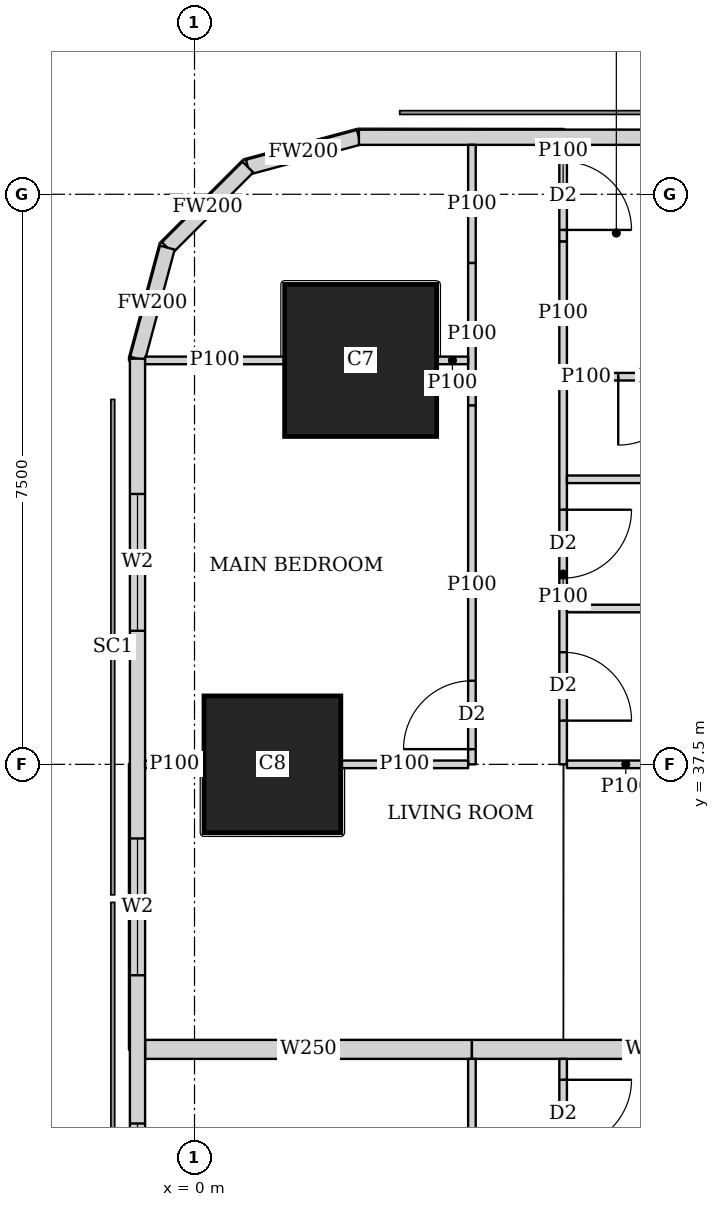
"""IFC4 building model, lengths in metres.
Left out: names, types, materials, properties, quantities, classifications, styles, units other than length and angle.
Written with IfcOpenShell. Run it as: python <this file> out.ifc"""

import sys

from ifc_helpers import new_model, si_unit, direction, frame, frame_2d, origin, origin_2d, place, context, subcontext, project, spatial, rectangle, extrude, element, fill, save


model = new_model("IFC4")
c1 = context("Model", 3, precision=1e-05, world=origin(), true_north=direction((0.0, 1.0)))
c2 = subcontext(c1, "Body", "Model", "MODEL_VIEW")
j1 = project(units=[si_unit("LENGTHUNIT", "METRE"), si_unit("PLANEANGLEUNIT", "RADIAN")], contexts=[c1])
p1 = place(None, origin())
s1 = spatial("IfcSite", under=j1, at=p1, CompositionType="ELEMENT")
p2 = place(p1, origin())
s2 = spatial("IfcBuilding", under=s1, at=p2, CompositionType="ELEMENT")
p3 = place(p2, frame((0.0, 0.0, 135.8)))
s3 = spatial("IfcBuildingStorey", under=s2, at=p3, CompositionType="ELEMENT", Elevation=135.8)
p4 = place(p3, frame((1.025, 37.5, 0.0), z_axis=(0.0, 0.0, 1.0), x_axis=(1.0, 0.0, 0.0)))
e1 = element("IfcColumn", 1, at=p4, inside=s3, PredefinedType="COLUMN", context=c2, shape_type="SweptSolid", body=[
    extrude(rectangle(XDim=1.8, YDim=1.8, at=origin_2d()), origin(), (0.0, 0.0, 1.0), 3.75),
])
p5 = place(p3, frame((2.186, 42.814, 0.0), z_axis=(0.0, 0.0, 1.0), x_axis=(1.0, 0.0, 0.0)))
e2 = element("IfcColumn", 2, at=p5, inside=s3, PredefinedType="COLUMN", context=c2, shape_type="SweptSolid", body=[
    extrude(rectangle(XDim=2.0, YDim=2.0, at=origin_2d()), origin(), (0.0, 0.0, 1.0), 3.75),
])
p6 = place(p3, frame((40.106, 45.75, 0.0), z_axis=(0.0, 0.0, 1.0), x_axis=(-1.0, 0.0, 0.0)))
e3 = element("IfcWall", 3, at=p6, inside=s3, PredefinedType="SOLIDWALL", context=c2, shape_type="SweptSolid", body=[
    extrude(rectangle(XDim=37.943, YDim=0.2, at=frame_2d((18.971, 0.0))), origin(), (0.0, 0.0, 1.0), 3.5),
])
p7 = place(p6, frame((8.606, 0.0, 0.9)))
e4 = element("IfcOpeningElement", 4, at=p7, cuts=e3, PredefinedType="OPENING", context=c2, shape_type="SweptSolid", body=[
    extrude(rectangle(XDim=1.8, YDim=1.5, at=frame_2d((0.9, 0.75))), frame((0.0, 0.11, 0.0), z_axis=(0.0, -1.0, 0.0), x_axis=(1.0, 0.0, 0.0)), (0.0, 0.0, 1.0), 0.22),
])
p8 = place(p6, frame((12.206, 0.0, 0.9)))
e5 = element("IfcOpeningElement", 5, at=p8, cuts=e3, PredefinedType="OPENING", context=c2, shape_type="SweptSolid", body=[
    extrude(rectangle(XDim=1.8, YDim=1.5, at=frame_2d((0.9, 0.75))), frame((0.0, 0.11, 0.0), z_axis=(0.0, -1.0, 0.0), x_axis=(1.0, 0.0, 0.0)), (0.0, 0.0, 1.0), 0.22),
])
p9 = place(p6, frame((15.806, 0.0, 0.9)))
e6 = element("IfcOpeningElement", 6, at=p9, cuts=e3, PredefinedType="OPENING", context=c2, shape_type="SweptSolid", body=[
    extrude(rectangle(XDim=1.8, YDim=1.5, at=frame_2d((0.9, 0.75))), frame((0.0, 0.11, 0.0), z_axis=(0.0, -1.0, 0.0), x_axis=(1.0, 0.0, 0.0)), (0.0, 0.0, 1.0), 0.22),
])
p10 = place(p6, frame((19.406, 0.0, 0.9)))
e7 = element("IfcOpeningElement", 7, at=p10, cuts=e3, PredefinedType="OPENING", context=c2, shape_type="SweptSolid", body=[
    extrude(rectangle(XDim=1.8, YDim=1.5, at=frame_2d((0.9, 0.75))), frame((0.0, 0.11, 0.0), z_axis=(0.0, -1.0, 0.0), x_axis=(1.0, 0.0, 0.0)), (0.0, 0.0, 1.0), 0.22),
])
p11 = place(p6, frame((23.006, 0.0, 0.9)))
e8 = element("IfcOpeningElement", 8, at=p11, cuts=e3, PredefinedType="OPENING", context=c2, shape_type="SweptSolid", body=[
    extrude(rectangle(XDim=1.8, YDim=1.5, at=frame_2d((0.9, 0.75))), frame((0.0, 0.11, 0.0), z_axis=(0.0, -1.0, 0.0), x_axis=(1.0, 0.0, 0.0)), (0.0, 0.0, 1.0), 0.22),
])
p12 = place(p6, frame((26.606, 0.0, 0.9)))
e9 = element("IfcOpeningElement", 9, at=p12, cuts=e3, PredefinedType="OPENING", context=c2, shape_type="SweptSolid", body=[
    extrude(rectangle(XDim=1.8, YDim=1.5, at=frame_2d((0.9, 0.75))), frame((0.0, 0.11, 0.0), z_axis=(0.0, -1.0, 0.0), x_axis=(1.0, 0.0, 0.0)), (0.0, 0.0, 1.0), 0.22),
])
p13 = place(p3, frame((2.163, 45.75, 0.0), z_axis=(0.0, 0.0, 1.0), x_axis=(-0.965832000415, -0.259168954497, 0.0)))
e10 = element("IfcWall", 10, at=p13, inside=s3, PredefinedType="SOLIDWALL", context=c2, shape_type="SweptSolid", body=[
    extrude(rectangle(XDim=1.513, YDim=0.2, at=frame_2d((0.756, 0.0))), origin(), (0.0, 0.0, 1.0), 3.5),
])
p14 = place(p3, frame((0.702, 45.358, 0.0), z_axis=(0.0, 0.0, 1.0), x_axis=(-0.707106781187, -0.707106781187, 0.0)))
e11 = element("IfcWall", 11, at=p14, inside=s3, PredefinedType="SOLIDWALL", context=c2, shape_type="SweptSolid", body=[
    extrude(rectangle(XDim=1.499, YDim=0.2, at=frame_2d((0.75, 0.0))), origin(), (0.0, 0.0, 1.0), 3.5),
])
p15 = place(p3, frame((-0.358, 44.298, 0.0), z_axis=(0.0, 0.0, 1.0), x_axis=(-0.259168954497, -0.965832000415, 0.0)))
e12 = element("IfcWall", 12, at=p15, inside=s3, PredefinedType="SOLIDWALL", context=c2, shape_type="SweptSolid", body=[
    extrude(rectangle(XDim=1.513, YDim=0.2, at=frame_2d((0.756, 0.0))), origin(), (0.0, 0.0, 1.0), 3.5),
])
p16 = place(p3, frame((-0.75, 42.837, 0.0), z_axis=(0.0, 0.0, 1.0), x_axis=(0.0, -1.0, 0.0)))
e13 = element("IfcWall", 13, at=p16, inside=s3, PredefinedType="SOLIDWALL", context=c2, shape_type="SweptSolid", body=[
    extrude(rectangle(XDim=40.674, YDim=0.2, at=frame_2d((20.337, 0.0))), origin(), (0.0, 0.0, 1.0), 3.5),
])
p17 = place(p16, frame((1.78, 0.0, 0.9)))
e14 = element("IfcOpeningElement", 14, at=p17, cuts=e13, PredefinedType="OPENING", context=c2, shape_type="SweptSolid", body=[
    extrude(rectangle(XDim=1.8, YDim=1.5, at=frame_2d((0.9, 0.75))), frame((0.0, 0.11, 0.0), z_axis=(0.0, -1.0, 0.0), x_axis=(1.0, 0.0, 0.0)), (0.0, 0.0, 1.0), 0.22),
])
p18 = place(p16, frame((6.312, 0.0, 0.9)))
e15 = element("IfcOpeningElement", 15, at=p18, cuts=e13, PredefinedType="OPENING", context=c2, shape_type="SweptSolid", body=[
    extrude(rectangle(XDim=1.8, YDim=1.5, at=frame_2d((0.9, 0.75))), frame((0.0, 0.11, 0.0), z_axis=(0.0, -1.0, 0.0), x_axis=(1.0, 0.0, 0.0)), (0.0, 0.0, 1.0), 0.22),
])
p19 = place(p16, frame((10.062, 0.0, 0.9)))
e16 = element("IfcOpeningElement", 16, at=p19, cuts=e13, PredefinedType="OPENING", context=c2, shape_type="SweptSolid", body=[
    extrude(rectangle(XDim=1.8, YDim=1.5, at=frame_2d((0.9, 0.75))), frame((0.0, 0.11, 0.0), z_axis=(0.0, -1.0, 0.0), x_axis=(1.0, 0.0, 0.0)), (0.0, 0.0, 1.0), 0.22),
])
p20 = place(p16, frame((13.812, 0.0, 0.9)))
e17 = element("IfcOpeningElement", 17, at=p20, cuts=e13, PredefinedType="OPENING", context=c2, shape_type="SweptSolid", body=[
    extrude(rectangle(XDim=1.8, YDim=1.5, at=frame_2d((0.9, 0.75))), frame((0.0, 0.11, 0.0), z_axis=(0.0, -1.0, 0.0), x_axis=(1.0, 0.0, 0.0)), (0.0, 0.0, 1.0), 0.22),
])
p21 = place(p16, frame((17.562, 0.0, 0.9)))
e18 = element("IfcOpeningElement", 18, at=p21, cuts=e13, PredefinedType="OPENING", context=c2, shape_type="SweptSolid", body=[
    extrude(rectangle(XDim=1.8, YDim=1.5, at=frame_2d((0.9, 0.75))), frame((0.0, 0.11, 0.0), z_axis=(0.0, -1.0, 0.0), x_axis=(1.0, 0.0, 0.0)), (0.0, 0.0, 1.0), 0.22),
])
p22 = place(p16, frame((21.312, 0.0, 0.9)))
e19 = element("IfcOpeningElement", 19, at=p22, cuts=e13, PredefinedType="OPENING", context=c2, shape_type="SweptSolid", body=[
    extrude(rectangle(XDim=1.8, YDim=1.5, at=frame_2d((0.9, 0.75))), frame((0.0, 0.11, 0.0), z_axis=(0.0, -1.0, 0.0), x_axis=(1.0, 0.0, 0.0)), (0.0, 0.0, 1.0), 0.22),
])
p23 = place(p16, frame((25.062, 0.0, 0.9)))
e20 = element("IfcOpeningElement", 20, at=p23, cuts=e13, PredefinedType="OPENING", context=c2, shape_type="SweptSolid", body=[
    extrude(rectangle(XDim=1.8, YDim=1.5, at=frame_2d((0.9, 0.75))), frame((0.0, 0.11, 0.0), z_axis=(0.0, -1.0, 0.0), x_axis=(1.0, 0.0, 0.0)), (0.0, 0.0, 1.0), 0.22),
])
p24 = place(p16, frame((28.812, 0.0, 0.9)))
e21 = element("IfcOpeningElement", 21, at=p24, cuts=e13, PredefinedType="OPENING", context=c2, shape_type="SweptSolid", body=[
    extrude(rectangle(XDim=1.8, YDim=1.5, at=frame_2d((0.9, 0.75))), frame((0.0, 0.11, 0.0), z_axis=(0.0, -1.0, 0.0), x_axis=(1.0, 0.0, 0.0)), (0.0, 0.0, 1.0), 0.22),
])
p25 = place(p16, frame((32.562, 0.0, 0.9)))
e22 = element("IfcOpeningElement", 22, at=p25, cuts=e13, PredefinedType="OPENING", context=c2, shape_type="SweptSolid", body=[
    extrude(rectangle(XDim=1.8, YDim=1.5, at=frame_2d((0.9, 0.75))), frame((0.0, 0.11, 0.0), z_axis=(0.0, -1.0, 0.0), x_axis=(1.0, 0.0, 0.0)), (0.0, 0.0, 1.0), 0.22),
])
p26 = place(p16, frame((37.094, 0.0, 0.9)))
e23 = element("IfcOpeningElement", 23, at=p26, cuts=e13, PredefinedType="OPENING", context=c2, shape_type="SweptSolid", body=[
    extrude(rectangle(XDim=1.8, YDim=1.5, at=frame_2d((0.9, 0.75))), frame((0.0, 0.11, 0.0), z_axis=(0.0, -1.0, 0.0), x_axis=(1.0, 0.0, 0.0)), (0.0, 0.0, 1.0), 0.22),
])
p27 = place(p3, frame((3.65, 30.0, 0.0), z_axis=(0.0, 0.0, 1.0), x_axis=(0.0, 1.0, 0.0)))
e24 = element("IfcWall", 24, at=p27, inside=s3, PredefinedType="PARTITIONING", context=c2, shape_type="SweptSolid", body=[
    extrude(rectangle(XDim=3.625, YDim=0.1, at=frame_2d((1.812, 0.0))), origin(), (0.0, 0.0, 1.0), 3.5),
])
p28 = place(p27, frame((0.2, 0.0, 0.0)))
e25 = element("IfcOpeningElement", 25, at=p28, cuts=e24, PredefinedType="OPENING", context=c2, shape_type="SweptSolid", body=[
    extrude(rectangle(XDim=0.9, YDim=2.1, at=frame_2d((0.45, 1.05))), frame((0.0, 0.06, 0.0), z_axis=(0.0, -1.0, 0.0), x_axis=(1.0, 0.0, 0.0)), (0.0, 0.0, 1.0), 0.12),
])
p29 = place(p3, frame((4.85, 30.0, 0.0), z_axis=(0.0, 0.0, 1.0), x_axis=(0.0, 1.0, 0.0)))
e26 = element("IfcWall", 26, at=p29, inside=s3, PredefinedType="PARTITIONING", context=c2, shape_type="SweptSolid", body=[
    extrude(rectangle(XDim=3.625, YDim=0.1, at=frame_2d((1.812, 0.0))), origin(), (0.0, 0.0, 1.0), 3.5),
])
p30 = place(p29, frame((0.575, 0.0, 0.0)))
e27 = element("IfcOpeningElement", 27, at=p30, cuts=e26, PredefinedType="OPENING", context=c2, shape_type="SweptSolid", body=[
    extrude(rectangle(XDim=0.9, YDim=2.1, at=frame_2d((0.45, 1.05))), frame((0.0, 0.06, 0.0), z_axis=(0.0, -1.0, 0.0), x_axis=(1.0, 0.0, 0.0)), (0.0, 0.0, 1.0), 0.12),
])
p31 = place(p29, frame((2.45, 0.0, 0.0)))
e28 = element("IfcOpeningElement", 28, at=p31, cuts=e26, PredefinedType="OPENING", context=c2, shape_type="SweptSolid", body=[
    extrude(rectangle(XDim=0.9, YDim=2.1, at=frame_2d((0.45, 1.05))), frame((0.0, 0.06, 0.0), z_axis=(0.0, -1.0, 0.0), x_axis=(1.0, 0.0, 0.0)), (0.0, 0.0, 1.0), 0.12),
])
p32 = place(p3, frame((3.65, 37.5, 0.0), z_axis=(0.0, 0.0, 1.0), x_axis=(0.0, 1.0, 0.0)))
e29 = element("IfcWall", 29, at=p32, inside=s3, PredefinedType="PARTITIONING", context=c2, shape_type="SweptSolid", body=[
    extrude(rectangle(XDim=4.724, YDim=0.1, at=frame_2d((2.362, 0.0))), origin(), (0.0, 0.0, 1.0), 3.5),
])
p33 = place(p32, frame((0.2, 0.0, 0.0)))
e30 = element("IfcOpeningElement", 30, at=p33, cuts=e29, PredefinedType="OPENING", context=c2, shape_type="SweptSolid", body=[
    extrude(rectangle(XDim=0.9, YDim=2.1, at=frame_2d((0.45, 1.05))), frame((0.0, 0.06, 0.0), z_axis=(0.0, -1.0, 0.0), x_axis=(1.0, 0.0, 0.0)), (0.0, 0.0, 1.0), 0.12),
])
p34 = place(p3, frame((3.65, 42.224, 0.0), z_axis=(0.0, 0.0, 1.0), x_axis=(0.0, 1.0, 0.0)))
e31 = element("IfcWall", 31, at=p34, inside=s3, PredefinedType="PARTITIONING", context=c2, shape_type="SweptSolid", body=[
    extrude(rectangle(XDim=1.873, YDim=0.1, at=frame_2d((0.937, 0.0))), origin(), (0.0, 0.0, 1.0), 2.1),
])
p35 = place(p3, frame((3.65, 44.097, 0.0), z_axis=(0.0, 0.0, 1.0), x_axis=(0.0, 1.0, 0.0)))
e32 = element("IfcWall", 32, at=p35, inside=s3, PredefinedType="PARTITIONING", context=c2, shape_type="SweptSolid", body=[
    extrude(rectangle(XDim=1.553, YDim=0.1, at=frame_2d((0.776, 0.0))), origin(), (0.0, 0.0, 1.0), 3.5),
])
p36 = place(p3, frame((4.85, 37.5, 0.0), z_axis=(0.0, 0.0, 1.0), x_axis=(0.0, 1.0, 0.0)))
e33 = element("IfcWall", 33, at=p36, inside=s3, PredefinedType="PARTITIONING", context=c2, shape_type="SweptSolid", body=[
    extrude(rectangle(XDim=5.007, YDim=0.1, at=frame_2d((2.503, 0.0))), origin(), (0.0, 0.0, 1.0), 3.5),
])
p37 = place(p36, frame((0.575, 0.0, 0.0)))
e34 = element("IfcOpeningElement", 34, at=p37, cuts=e33, PredefinedType="OPENING", context=c2, shape_type="SweptSolid", body=[
    extrude(rectangle(XDim=0.9, YDim=2.1, at=frame_2d((0.45, 1.05))), frame((0.0, 0.06, 0.0), z_axis=(0.0, -1.0, 0.0), x_axis=(1.0, 0.0, 0.0)), (0.0, 0.0, 1.0), 0.12),
])
p38 = place(p36, frame((2.45, 0.0, 0.0)))
e35 = element("IfcOpeningElement", 35, at=p38, cuts=e33, PredefinedType="OPENING", context=c2, shape_type="SweptSolid", body=[
    extrude(rectangle(XDim=0.9, YDim=2.1, at=frame_2d((0.45, 1.05))), frame((0.0, 0.06, 0.0), z_axis=(0.0, -1.0, 0.0), x_axis=(1.0, 0.0, 0.0)), (0.0, 0.0, 1.0), 0.12),
])
p39 = place(p3, frame((4.85, 42.507, 0.0), z_axis=(0.0, 0.0, 1.0), x_axis=(0.0, 1.0, 0.0)))
e36 = element("IfcWall", 36, at=p39, inside=s3, PredefinedType="PARTITIONING", context=c2, shape_type="SweptSolid", body=[
    extrude(rectangle(XDim=1.874, YDim=0.1, at=frame_2d((0.937, 0.0))), origin(), (0.0, 0.0, 1.0), 2.1),
])
p40 = place(p3, frame((4.85, 44.381, 0.0), z_axis=(0.0, 0.0, 1.0), x_axis=(0.0, 1.0, 0.0)))
e37 = element("IfcWall", 37, at=p40, inside=s3, PredefinedType="PARTITIONING", context=c2, shape_type="SweptSolid", body=[
    extrude(rectangle(XDim=1.269, YDim=0.1, at=frame_2d((0.634, 0.0))), origin(), (0.0, 0.0, 1.0), 3.5),
])
p41 = place(p40, frame((0.15, 0.0, 0.0)))
e38 = element("IfcOpeningElement", 38, at=p41, cuts=e37, PredefinedType="OPENING", context=c2, shape_type="SweptSolid", body=[
    extrude(rectangle(XDim=0.9, YDim=2.1, at=frame_2d((0.45, 1.05))), frame((0.0, 0.06, 0.0), z_axis=(0.0, -1.0, 0.0), x_axis=(1.0, 0.0, 0.0)), (0.0, 0.0, 1.0), 0.12),
])
p42 = place(p3, frame((-0.65, 37.5, 0.0), z_axis=(0.0, 0.0, 1.0), x_axis=(1.0, 0.0, 0.0)))
e39 = element("IfcWall", 39, at=p42, inside=s3, PredefinedType="PARTITIONING", context=c2, shape_type="SweptSolid", body=[
    extrude(rectangle(XDim=0.774, YDim=0.1, at=frame_2d((0.387, 0.0))), origin(), (0.0, 0.0, 1.0), 3.5),
])
p43 = place(p3, frame((1.926, 37.5, 0.0), z_axis=(0.0, 0.0, 1.0), x_axis=(1.0, 0.0, 0.0)))
e40 = element("IfcWall", 40, at=p43, inside=s3, PredefinedType="PARTITIONING", context=c2, shape_type="SweptSolid", body=[
    extrude(rectangle(XDim=1.674, YDim=0.1, at=frame_2d((0.837, 0.0))), origin(), (0.0, 0.0, 1.0), 2.1),
])
p44 = place(p3, frame((-0.65, 42.814, 0.0), z_axis=(0.0, 0.0, 1.0), x_axis=(1.0, 0.0, 0.0)))
e41 = element("IfcWall", 41, at=p44, inside=s3, PredefinedType="PARTITIONING", context=c2, shape_type="SweptSolid", body=[
    extrude(rectangle(XDim=1.835, YDim=0.1, at=frame_2d((0.917, 0.0))), origin(), (0.0, 0.0, 1.0), 3.5),
])
p45 = place(p3, frame((3.187, 42.814, 0.0), z_axis=(0.0, 0.0, 1.0), x_axis=(1.0, 0.0, 0.0)))
e42 = element("IfcWall", 42, at=p45, inside=s3, PredefinedType="PARTITIONING", context=c2, shape_type="SweptSolid", body=[
    extrude(rectangle(XDim=0.413, YDim=0.1, at=frame_2d((0.207, 0.0))), origin(), (0.0, 0.0, 1.0), 2.1),
])
p46 = place(p3, frame((4.9, 37.5, 0.0), z_axis=(0.0, 0.0, 1.0), x_axis=(1.0, 0.0, 0.0)))
e43 = element("IfcWall", 43, at=p46, inside=s3, PredefinedType="PARTITIONING", context=c2, shape_type="SweptSolid", body=[
    extrude(rectangle(XDim=1.549, YDim=0.1, at=frame_2d((0.774, 0.0))), origin(), (0.0, 0.0, 1.0), 3.5),
])
for number, where, z_axis, x_axis in (
    (44, (4.9, 41.25, 0.0), (0.0, 0.0, 1.0), (1.0, 0.0, 0.0)),
    (45, (4.9, 39.55, 0.0), (0.0, 0.0, 1.0), (1.0, 0.0, 0.0)),
):
    element("IfcWall", number, at=place(p3, frame(where, z_axis=z_axis, x_axis=x_axis)), inside=s3, PredefinedType="PARTITIONING", context=c2, shape_type="SweptSolid", body=[
        extrude(rectangle(XDim=3.525, YDim=0.1, at=frame_2d((1.763, 0.0))), origin(), (0.0, 0.0, 1.0), 3.5),
    ])
p47 = place(p3, frame((-0.65, 33.75, 0.0), z_axis=(0.0, 0.0, 1.0), x_axis=(1.0, 0.0, 0.0)))
e46 = element("IfcWall", 46, at=p47, inside=s3, PredefinedType="SOLIDWALL", context=c2, shape_type="SweptSolid", body=[
    extrude(rectangle(XDim=4.3, YDim=0.25, at=frame_2d((2.15, 0.0))), origin(), (0.0, 0.0, 1.0), 2.1),
])
p48 = place(p3, frame((3.65, 33.75, 0.0), z_axis=(0.0, 0.0, 1.0), x_axis=(1.0, 0.0, 0.0)))
e47 = element("IfcWall", 47, at=p48, inside=s3, PredefinedType="SOLIDWALL", context=c2, shape_type="SweptSolid", body=[
    extrude(rectangle(XDim=4.775, YDim=0.25, at=frame_2d((2.388, 0.0))), origin(), (0.0, 0.0, 1.0), 3.5),
])
p49 = place(p3, frame((8.425, 42.6, 0.0), z_axis=(0.0, 0.0, 1.0), x_axis=(-1.0, 0.0, 0.0)))
e48 = element("IfcWall", 48, at=p49, inside=s3, PredefinedType="PARTITIONING", context=c2, shape_type="SweptSolid", body=[
    extrude(rectangle(XDim=3.022, YDim=0.1, at=frame_2d((1.511, 0.0))), origin(), (0.0, 0.0, 1.0), 3.5),
])
p50 = place(p49, frame((1.95, 0.0, 0.0)))
e49 = element("IfcOpeningElement", 49, at=p50, cuts=e48, PredefinedType="OPENING", context=c2, shape_type="SweptSolid", body=[
    extrude(rectangle(XDim=0.9, YDim=2.1, at=frame_2d((0.45, 1.05))), frame((0.0, 0.06, 0.0), z_axis=(0.0, -1.0, 0.0), x_axis=(1.0, 0.0, 0.0)), (0.0, 0.0, 1.0), 0.12),
])
p51 = place(p3, frame((5.403, 42.6, 0.0), z_axis=(0.0, 0.0, 1.0), x_axis=(-1.0, 0.0, 0.0)))
e50 = element("IfcWall", 50, at=p51, inside=s3, PredefinedType="PARTITIONING", context=c2, shape_type="SweptSolid", body=[
    extrude(rectangle(XDim=0.503, YDim=0.1, at=frame_2d((0.251, 0.0))), origin(), (0.0, 0.0, 1.0), 2.1),
])
p52 = place(p17, origin())
e51 = element("IfcWindow", 51, at=p52, inside=s3, PartitioningType="SINGLE_PANEL", PredefinedType="WINDOW", context=c2, shape_type="SweptSolid", body=[
    extrude(rectangle(XDim=1.8, YDim=1.5, at=frame_2d((0.9, 0.75))), frame((0.0, 0.03, 0.0), z_axis=(0.0, -1.0, 0.0), x_axis=(1.0, 0.0, 0.0)), (0.0, 0.0, 1.0), 0.06),
])
fill(e14, e51)
p53 = place(p18, origin())
e52 = element("IfcWindow", 52, at=p53, inside=s3, PartitioningType="SINGLE_PANEL", PredefinedType="WINDOW", context=c2, shape_type="SweptSolid", body=[
    extrude(rectangle(XDim=1.8, YDim=1.5, at=frame_2d((0.9, 0.75))), frame((0.0, 0.03, 0.0), z_axis=(0.0, -1.0, 0.0), x_axis=(1.0, 0.0, 0.0)), (0.0, 0.0, 1.0), 0.06),
])
fill(e15, e52)
p54 = place(p19, origin())
e53 = element("IfcWindow", 53, at=p54, inside=s3, PartitioningType="SINGLE_PANEL", PredefinedType="WINDOW", context=c2, shape_type="SweptSolid", body=[
    extrude(rectangle(XDim=1.8, YDim=1.5, at=frame_2d((0.9, 0.75))), frame((0.0, 0.03, 0.0), z_axis=(0.0, -1.0, 0.0), x_axis=(1.0, 0.0, 0.0)), (0.0, 0.0, 1.0), 0.06),
])
fill(e16, e53)
p55 = place(p31, origin())
e54 = element("IfcDoor", 54, at=p55, inside=s3, OperationType="SINGLE_SWING_LEFT", PredefinedType="DOOR", context=c2, shape_type="SweptSolid", body=[
    extrude(rectangle(XDim=0.9, YDim=2.1, at=frame_2d((0.45, 1.05))), frame((0.0, 0.025, 0.0), z_axis=(0.0, -1.0, 0.0), x_axis=(1.0, 0.0, 0.0)), (0.0, 0.0, 1.0), 0.05),
])
fill(e28, e54)
p56 = place(p33, origin())
e55 = element("IfcDoor", 55, at=p56, inside=s3, OperationType="SINGLE_SWING_LEFT", PredefinedType="DOOR", context=c2, shape_type="SweptSolid", body=[
    extrude(rectangle(XDim=0.9, YDim=2.1, at=frame_2d((0.45, 1.05))), frame((0.0, 0.025, 0.0), z_axis=(0.0, -1.0, 0.0), x_axis=(1.0, 0.0, 0.0)), (0.0, 0.0, 1.0), 0.05),
])
fill(e30, e55)
p57 = place(p37, origin())
e56 = element("IfcDoor", 56, at=p57, inside=s3, OperationType="SINGLE_SWING_RIGHT", PredefinedType="DOOR", context=c2, shape_type="SweptSolid", body=[
    extrude(rectangle(XDim=0.9, YDim=2.1, at=frame_2d((0.45, 1.05))), frame((0.0, 0.025, 0.0), z_axis=(0.0, -1.0, 0.0), x_axis=(1.0, 0.0, 0.0)), (0.0, 0.0, 1.0), 0.05),
])
fill(e34, e56)
p58 = place(p41, origin())
e57 = element("IfcDoor", 57, at=p58, inside=s3, OperationType="SINGLE_SWING_RIGHT", PredefinedType="DOOR", context=c2, shape_type="SweptSolid", body=[
    extrude(rectangle(XDim=0.9, YDim=2.1, at=frame_2d((0.45, 1.05))), frame((0.0, 0.025, 0.0), z_axis=(0.0, -1.0, 0.0), x_axis=(1.0, 0.0, 0.0)), (0.0, 0.0, 1.0), 0.05),
])
fill(e38, e57)
p59 = place(p38, origin())
e58 = element("IfcDoor", 58, at=p59, inside=s3, OperationType="SINGLE_SWING_LEFT", PredefinedType="DOOR", context=c2, shape_type="SweptSolid", body=[
    extrude(rectangle(XDim=0.9, YDim=2.1, at=frame_2d((0.45, 1.05))), frame((0.0, 0.025, 0.0), z_axis=(0.0, -1.0, 0.0), x_axis=(1.0, 0.0, 0.0)), (0.0, 0.0, 1.0), 0.05),
])
fill(e35, e58)
p60 = place(p50, origin())
e59 = element("IfcDoor", 59, at=p60, inside=s3, OperationType="SINGLE_SWING_RIGHT", PredefinedType="DOOR", context=c2, shape_type="SweptSolid", body=[
    extrude(rectangle(XDim=0.9, YDim=2.1, at=frame_2d((0.45, 1.05))), frame((0.0, 0.025, 0.0), z_axis=(0.0, -1.0, 0.0), x_axis=(1.0, 0.0, 0.0)), (0.0, 0.0, 1.0), 0.05),
])
fill(e49, e59)
save(model, sys.argv[1])
